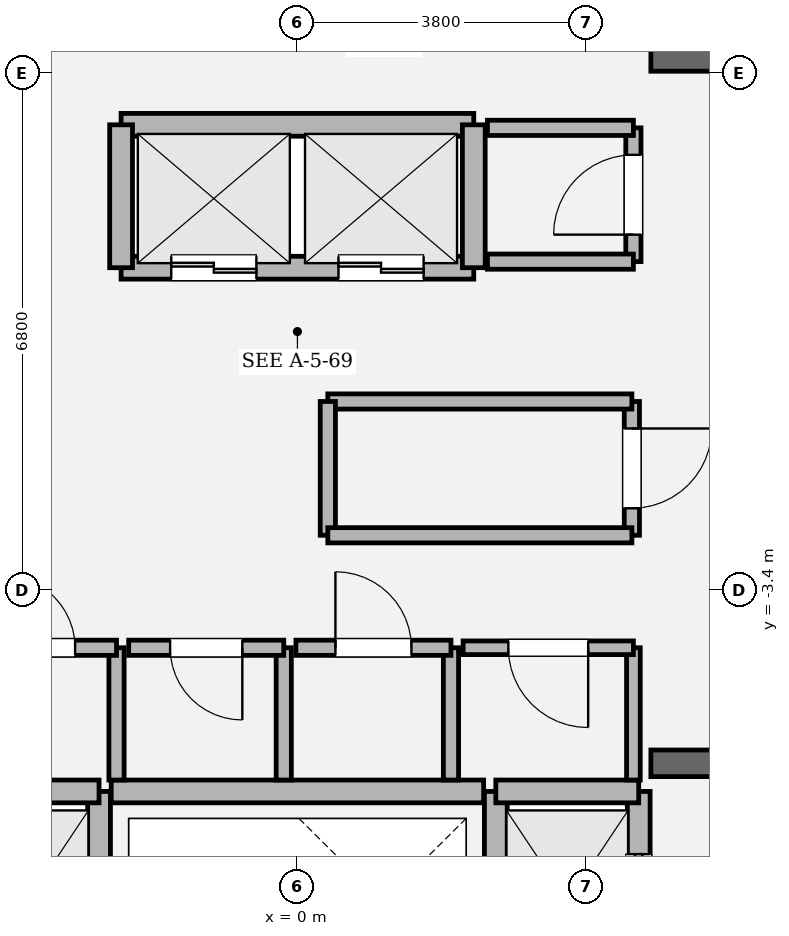
"""IFC4 building model, lengths in metres.
Left out: names, types, materials, properties, quantities, classifications, styles, units other than length and angle.
Written with IfcOpenShell. Run it as: python <this file> out.ifc"""

import sys

from ifc_helpers import new_model, si_unit, direction, frame, frame_2d, origin, place, context, subcontext, project, spatial, rectangle, extrude, element, fill, save


model = new_model("IFC4")
c1 = context("Model", 3, precision=1e-05, world=origin(), true_north=direction((0.0, 1.0)))
c2 = subcontext(c1, "Body", "Model", "MODEL_VIEW")
j1 = project(units=[si_unit("LENGTHUNIT", "METRE"), si_unit("PLANEANGLEUNIT", "RADIAN")], contexts=[c1])
p1 = place(None, origin())
s1 = spatial("IfcSite", under=j1, at=p1, CompositionType="ELEMENT")
p2 = place(p1, origin())
s2 = spatial("IfcBuilding", under=s1, at=p2, CompositionType="ELEMENT")
p3 = place(p2, frame((0.0, 0.0, 330.0)))
s3 = spatial("IfcBuildingStorey", under=s2, at=p3, CompositionType="ELEMENT", Elevation=330.0)
p4 = place(p3, frame((4.65, -5.68, 0.0), z_axis=(0.0, 0.0, 1.0), x_axis=(1.0, 0.0, 0.0)))
e1 = element("IfcWall", 1, at=p4, inside=s3, PredefinedType="SOLIDWALL", context=c2, shape_type="SweptSolid", body=[
    extrude(rectangle(XDim=5.325, YDim=0.35, at=frame_2d((2.663, 0.0))), origin(), (0.0, 0.0, 1.0), 4.2),
])
p5 = place(p4, frame((2.71, 0.0, 0.0)))
e2 = element("IfcOpeningElement", 2, at=p5, cuts=e1, PredefinedType="OPENING", context=c2, shape_type="SweptSolid", body=[
    extrude(rectangle(XDim=1.18, YDim=2.2, at=frame_2d((0.59, 1.1))), frame((0.0, 0.185, 0.0), z_axis=(0.0, -1.0, 0.0), x_axis=(1.0, 0.0, 0.0)), (0.0, 0.0, 1.0), 0.37),
])
p6 = place(p3, frame((4.65, 3.6, 0.0), z_axis=(0.0, 0.0, 1.0), x_axis=(1.0, 0.0, 0.0)))
e3 = element("IfcWall", 3, at=p6, inside=s3, PredefinedType="SOLIDWALL", context=c2, shape_type="SweptSolid", body=[
    extrude(rectangle(XDim=5.325, YDim=0.35, at=frame_2d((2.663, 0.0))), origin(), (0.0, 0.0, 1.0), 4.2),
])
p7 = place(p3, frame((-2.61, -8.82, 0.0), z_axis=(0.0, 0.0, 1.0), x_axis=(0.0, 1.0, 0.0)))
e4 = element("IfcWall", 4, at=p7, inside=s3, PredefinedType="SOLIDWALL", context=c2, shape_type="SweptSolid", body=[
    extrude(rectangle(XDim=2.77, YDim=0.3, at=frame_2d((1.385, 0.0))), origin(), (0.0, 0.0, 1.0), 3.94),
])
p8 = place(p3, frame((-4.49, -6.05, 0.0), z_axis=(0.0, 0.0, 1.0), x_axis=(1.0, 0.0, 0.0)))
e5 = element("IfcWall", 5, at=p8, inside=s3, PredefinedType="SOLIDWALL", context=c2, shape_type="SweptSolid", body=[
    extrude(rectangle(XDim=1.88, YDim=0.3, at=frame_2d((0.94, 0.0))), origin(), (0.0, 0.0, 1.0), 3.94),
])
p9 = place(p3, frame((4.49, -8.82, 0.0), z_axis=(0.0, 0.0, 1.0), x_axis=(0.0, 1.0, 0.0)))
e6 = element("IfcWall", 6, at=p9, inside=s3, PredefinedType="SOLIDWALL", context=c2, shape_type="SweptSolid", body=[
    extrude(rectangle(XDim=2.77, YDim=0.3, at=frame_2d((1.385, 0.0))), origin(), (0.0, 0.0, 1.0), 3.94),
])
p10 = place(p9, frame((0.825, 0.0, 0.0)))
e7 = element("IfcOpeningElement", 7, at=p10, cuts=e6, PredefinedType="OPENING", context=c2, shape_type="SweptSolid", body=[
    extrude(rectangle(XDim=1.12, YDim=2.25, at=frame_2d((0.56, 1.125))), frame((0.0, 0.16, 0.0), z_axis=(0.0, -1.0, 0.0), x_axis=(1.0, 0.0, 0.0)), (0.0, 0.0, 1.0), 0.32),
])
p11 = place(p3, frame((2.61, -8.82, 0.0), z_axis=(0.0, 0.0, 1.0), x_axis=(0.0, 1.0, 0.0)))
e8 = element("IfcWall", 8, at=p11, inside=s3, PredefinedType="SOLIDWALL", context=c2, shape_type="SweptSolid", body=[
    extrude(rectangle(XDim=2.77, YDim=0.3, at=frame_2d((1.385, 0.0))), origin(), (0.0, 0.0, 1.0), 3.94),
])
p12 = place(p3, frame((2.61, -6.05, 0.0), z_axis=(0.0, 0.0, 1.0), x_axis=(1.0, 0.0, 0.0)))
e9 = element("IfcWall", 9, at=p12, inside=s3, PredefinedType="SOLIDWALL", context=c2, shape_type="SweptSolid", body=[
    extrude(rectangle(XDim=1.88, YDim=0.3, at=frame_2d((0.94, 0.0))), origin(), (0.0, 0.0, 1.0), 3.94),
])
p13 = place(p3, frame((-2.32, 0.84, 0.0), z_axis=(0.0, 0.0, 1.0), x_axis=(1.0, 0.0, 0.0)))
e10 = element("IfcWall", 10, at=p13, inside=s3, PredefinedType="SOLIDWALL", context=c2, shape_type="SweptSolid", body=[
    extrude(rectangle(XDim=4.64, YDim=0.3, at=frame_2d((2.32, 0.0))), origin(), (0.0, 0.0, 1.0), 3.94),
])
p14 = place(p13, frame((0.66, 0.0, 0.0)))
e11 = element("IfcOpeningElement", 11, at=p14, cuts=e10, PredefinedType="OPENING", context=c2, shape_type="SweptSolid", body=[
    extrude(rectangle(XDim=1.12, YDim=2.25, at=frame_2d((0.56, 1.125))), frame((0.0, 0.16, 0.0), z_axis=(0.0, -1.0, 0.0), x_axis=(1.0, 0.0, 0.0)), (0.0, 0.0, 1.0), 0.32),
])
p15 = place(p13, frame((2.86, 0.0, 0.0)))
e12 = element("IfcOpeningElement", 12, at=p15, cuts=e10, PredefinedType="OPENING", context=c2, shape_type="SweptSolid", body=[
    extrude(rectangle(XDim=1.12, YDim=2.25, at=frame_2d((0.56, 1.125))), frame((0.0, 0.16, 0.0), z_axis=(0.0, -1.0, 0.0), x_axis=(1.0, 0.0, 0.0)), (0.0, 0.0, 1.0), 0.32),
])
p16 = place(p3, frame((-2.32, 2.72, 0.0), z_axis=(0.0, 0.0, 1.0), x_axis=(1.0, 0.0, 0.0)))
e13 = element("IfcWall", 13, at=p16, inside=s3, PredefinedType="SOLIDWALL", context=c2, shape_type="SweptSolid", body=[
    extrude(rectangle(XDim=4.64, YDim=0.3, at=frame_2d((2.32, 0.0))), origin(), (0.0, 0.0, 1.0), 3.94),
])
for number, where, z_axis, x_axis in (
    (14, (-2.32, 0.84, 0.0), (0.0, 0.0, 1.0), (0.0, 1.0, 0.0)),
    (15, (2.32, 0.84, 0.0), (0.0, 0.0, 1.0), (0.0, 1.0, 0.0)),
):
    element("IfcWall", number, at=place(p3, frame(where, z_axis=z_axis, x_axis=x_axis)), inside=s3, PredefinedType="SOLIDWALL", context=c2, shape_type="SweptSolid", body=[
        extrude(rectangle(XDim=1.88, YDim=0.3, at=frame_2d((0.94, 0.0))), origin(), (0.0, 0.0, 1.0), 3.94),
    ])
p17 = place(p3, frame((-2.45, -6.05, 0.0), z_axis=(0.0, 0.0, 1.0), x_axis=(1.0, 0.0, 0.0)))
e16 = element("IfcWall", 16, at=p17, inside=s3, PredefinedType="SOLIDWALL", context=c2, shape_type="SweptSolid", body=[
    extrude(rectangle(XDim=4.9, YDim=0.3, at=frame_2d((2.45, 0.0))), origin(), (0.0, 0.0, 1.0), 3.94),
])
p18 = place(p3, frame((-2.38, -5.9, 0.0), z_axis=(0.0, 0.0, 1.0), x_axis=(0.0, 1.0, 0.0)))
e17 = element("IfcWall", 17, at=p18, inside=s3, PredefinedType="SOLIDWALL", context=c2, shape_type="SweptSolid", body=[
    extrude(rectangle(XDim=1.74, YDim=0.2, at=frame_2d((0.87, 0.0))), origin(), (0.0, 0.0, 1.0), 3.94),
])
p19 = place(p3, frame((-2.38, -4.16, 0.0), z_axis=(0.0, 0.0, 1.0), x_axis=(-1.0, 0.0, 0.0)))
e18 = element("IfcWall", 18, at=p19, inside=s3, PredefinedType="SOLIDWALL", context=c2, shape_type="SweptSolid", body=[
    extrude(rectangle(XDim=2.04, YDim=0.2, at=frame_2d((1.02, 0.0))), origin(), (0.0, 0.0, 1.0), 3.94),
])
p20 = place(p19, frame((0.545, 0.0, 0.0)))
e19 = element("IfcOpeningElement", 19, at=p20, cuts=e18, PredefinedType="OPENING", context=c2, shape_type="SweptSolid", body=[
    extrude(rectangle(XDim=0.95, YDim=2.15, at=frame_2d((0.475, 1.075))), frame((0.0, 0.11, 0.0), z_axis=(0.0, -1.0, 0.0), x_axis=(1.0, 0.0, 0.0)), (0.0, 0.0, 1.0), 0.22),
])
p21 = place(p3, frame((-0.18, -5.9, 0.0), z_axis=(0.0, 0.0, 1.0), x_axis=(0.0, 1.0, 0.0)))
e20 = element("IfcWall", 20, at=p21, inside=s3, PredefinedType="SOLIDWALL", context=c2, shape_type="SweptSolid", body=[
    extrude(rectangle(XDim=1.74, YDim=0.2, at=frame_2d((0.87, 0.0))), origin(), (0.0, 0.0, 1.0), 3.94),
])
p22 = place(p3, frame((-0.18, -4.16, 0.0), z_axis=(0.0, 0.0, 1.0), x_axis=(-1.0, 0.0, 0.0)))
e21 = element("IfcWall", 21, at=p22, inside=s3, PredefinedType="SOLIDWALL", context=c2, shape_type="SweptSolid", body=[
    extrude(rectangle(XDim=2.04, YDim=0.2, at=frame_2d((1.02, 0.0))), origin(), (0.0, 0.0, 1.0), 3.94),
])
p23 = place(p22, frame((0.545, 0.0, 0.0)))
e22 = element("IfcOpeningElement", 22, at=p23, cuts=e21, PredefinedType="OPENING", context=c2, shape_type="SweptSolid", body=[
    extrude(rectangle(XDim=0.95, YDim=2.15, at=frame_2d((0.475, 1.075))), frame((0.0, 0.11, 0.0), z_axis=(0.0, -1.0, 0.0), x_axis=(1.0, 0.0, 0.0)), (0.0, 0.0, 1.0), 0.22),
])
p24 = place(p3, frame((2.02, -5.9, 0.0), z_axis=(0.0, 0.0, 1.0), x_axis=(0.0, 1.0, 0.0)))
e23 = element("IfcWall", 23, at=p24, inside=s3, PredefinedType="SOLIDWALL", context=c2, shape_type="SweptSolid", body=[
    extrude(rectangle(XDim=1.74, YDim=0.2, at=frame_2d((0.87, 0.0))), origin(), (0.0, 0.0, 1.0), 3.94),
])
p25 = place(p3, frame((2.02, -4.16, 0.0), z_axis=(0.0, 0.0, 1.0), x_axis=(-1.0, 0.0, 0.0)))
e24 = element("IfcWall", 24, at=p25, inside=s3, PredefinedType="SOLIDWALL", context=c2, shape_type="SweptSolid", body=[
    extrude(rectangle(XDim=2.04, YDim=0.2, at=frame_2d((1.02, 0.0))), origin(), (0.0, 0.0, 1.0), 3.94),
])
p26 = place(p25, frame((0.52, 0.0, 0.0)))
e25 = element("IfcOpeningElement", 25, at=p26, cuts=e24, PredefinedType="OPENING", context=c2, shape_type="SweptSolid", body=[
    extrude(rectangle(XDim=1.0, YDim=2.15, at=frame_2d((0.5, 1.075))), frame((0.0, 0.11, 0.0), z_axis=(0.0, -1.0, 0.0), x_axis=(1.0, 0.0, 0.0)), (0.0, 0.0, 1.0), 0.22),
])
p27 = place(p3, frame((4.42, -5.9, 0.0), z_axis=(0.0, 0.0, 1.0), x_axis=(0.0, 1.0, 0.0)))
e26 = element("IfcWall", 26, at=p27, inside=s3, PredefinedType="PARTITIONING", context=c2, shape_type="SweptSolid", body=[
    extrude(rectangle(XDim=1.74, YDim=0.18, at=frame_2d((0.87, 0.0))), origin(), (0.0, 0.0, 1.0), 3.94),
])
p28 = place(p3, frame((4.42, -4.16, 0.0), z_axis=(0.0, 0.0, 1.0), x_axis=(-1.0, 0.0, 0.0)))
e27 = element("IfcWall", 27, at=p28, inside=s3, PredefinedType="PARTITIONING", context=c2, shape_type="SweptSolid", body=[
    extrude(rectangle(XDim=2.24, YDim=0.18, at=frame_2d((1.12, 0.0))), origin(), (0.0, 0.0, 1.0), 3.94),
])
p29 = place(p28, frame((0.595, 0.0, 0.0)))
e28 = element("IfcOpeningElement", 28, at=p29, cuts=e27, PredefinedType="OPENING", context=c2, shape_type="SweptSolid", body=[
    extrude(rectangle(XDim=1.05, YDim=2.2, at=frame_2d((0.525, 1.1))), frame((0.0, 0.1, 0.0), z_axis=(0.0, -1.0, 0.0), x_axis=(1.0, 0.0, 0.0)), (0.0, 0.0, 1.0), 0.2),
])
p30 = place(p3, frame((4.4, -2.68, 0.0), z_axis=(0.0, 0.0, 1.0), x_axis=(0.0, 1.0, 0.0)))
e29 = element("IfcWall", 29, at=p30, inside=s3, PredefinedType="SOLIDWALL", context=c2, shape_type="SweptSolid", body=[
    extrude(rectangle(XDim=1.76, YDim=0.2, at=frame_2d((0.88, 0.0))), origin(), (0.0, 0.0, 1.0), 3.94),
])
p31 = place(p30, frame((0.355, 0.0, 0.0)))
e30 = element("IfcOpeningElement", 30, at=p31, cuts=e29, PredefinedType="OPENING", context=c2, shape_type="SweptSolid", body=[
    extrude(rectangle(XDim=1.05, YDim=2.2, at=frame_2d((0.525, 1.1))), frame((0.0, 0.11, 0.0), z_axis=(0.0, -1.0, 0.0), x_axis=(1.0, 0.0, 0.0)), (0.0, 0.0, 1.0), 0.22),
])
p32 = place(p3, frame((4.4, -0.92, 0.0), z_axis=(0.0, 0.0, 1.0), x_axis=(-1.0, 0.0, 0.0)))
e31 = element("IfcWall", 31, at=p32, inside=s3, PredefinedType="SOLIDWALL", context=c2, shape_type="SweptSolid", body=[
    extrude(rectangle(XDim=4.0, YDim=0.2, at=frame_2d((2.0, 0.0))), origin(), (0.0, 0.0, 1.0), 3.94),
])
p33 = place(p3, frame((0.4, -0.92, 0.0), z_axis=(0.0, 0.0, 1.0), x_axis=(0.0, -1.0, 0.0)))
e32 = element("IfcWall", 32, at=p33, inside=s3, PredefinedType="SOLIDWALL", context=c2, shape_type="SweptSolid", body=[
    extrude(rectangle(XDim=1.76, YDim=0.2, at=frame_2d((0.88, 0.0))), origin(), (0.0, 0.0, 1.0), 3.94),
])
p34 = place(p3, frame((0.4, -2.68, 0.0), z_axis=(0.0, 0.0, 1.0), x_axis=(1.0, 0.0, 0.0)))
e33 = element("IfcWall", 33, at=p34, inside=s3, PredefinedType="SOLIDWALL", context=c2, shape_type="SweptSolid", body=[
    extrude(rectangle(XDim=4.0, YDim=0.2, at=frame_2d((2.0, 0.0))), origin(), (0.0, 0.0, 1.0), 3.94),
])
p35 = place(p3, frame((4.42, 0.92, 0.0), z_axis=(0.0, 0.0, 1.0), x_axis=(0.0, 1.0, 0.0)))
e34 = element("IfcWall", 34, at=p35, inside=s3, PredefinedType="SOLIDWALL", context=c2, shape_type="SweptSolid", body=[
    extrude(rectangle(XDim=1.76, YDim=0.2, at=frame_2d((0.88, 0.0))), origin(), (0.0, 0.0, 1.0), 3.94),
])
p36 = place(p35, frame((0.355, 0.0, 0.0)))
e35 = element("IfcOpeningElement", 35, at=p36, cuts=e34, PredefinedType="OPENING", context=c2, shape_type="SweptSolid", body=[
    extrude(rectangle(XDim=1.05, YDim=2.2, at=frame_2d((0.525, 1.1))), frame((0.0, 0.11, 0.0), z_axis=(0.0, -1.0, 0.0), x_axis=(1.0, 0.0, 0.0)), (0.0, 0.0, 1.0), 0.22),
])
for number, where, z_axis, x_axis in (
    (36, (4.42, 2.68, 0.0), (0.0, 0.0, 1.0), (-1.0, 0.0, 0.0)),
    (37, (2.5, 0.92, 0.0), (0.0, 0.0, 1.0), (1.0, 0.0, 0.0)),
):
    element("IfcWall", number, at=place(p3, frame(where, z_axis=z_axis, x_axis=x_axis)), inside=s3, PredefinedType="SOLIDWALL", context=c2, shape_type="SweptSolid", body=[
        extrude(rectangle(XDim=1.92, YDim=0.2, at=frame_2d((0.96, 0.0))), origin(), (0.0, 0.0, 1.0), 3.94),
    ])
p37 = place(p10, origin())
e38 = element("IfcDoor", 38, at=p37, inside=s3, OperationType="SLIDING_TO_RIGHT", PredefinedType="DOOR", context=c2, shape_type="SweptSolid", body=[
    extrude(rectangle(XDim=1.12, YDim=2.25, at=frame_2d((0.56, 1.125))), frame((0.0, 0.025, 0.0), z_axis=(0.0, -1.0, 0.0), x_axis=(1.0, 0.0, 0.0)), (0.0, 0.0, 1.0), 0.05),
])
fill(e7, e38)
p38 = place(p14, origin())
e39 = element("IfcDoor", 39, at=p38, inside=s3, OperationType="DOUBLE_DOOR_SLIDING", PredefinedType="DOOR", context=c2, shape_type="SweptSolid", body=[
    extrude(rectangle(XDim=1.12, YDim=2.25, at=frame_2d((0.56, 1.125))), frame((0.0, 0.025, 0.0), z_axis=(0.0, -1.0, 0.0), x_axis=(1.0, 0.0, 0.0)), (0.0, 0.0, 1.0), 0.05),
])
fill(e11, e39)
p39 = place(p15, origin())
e40 = element("IfcDoor", 40, at=p39, inside=s3, OperationType="DOUBLE_DOOR_SLIDING", PredefinedType="DOOR", context=c2, shape_type="SweptSolid", body=[
    extrude(rectangle(XDim=1.12, YDim=2.25, at=frame_2d((0.56, 1.125))), frame((0.0, 0.025, 0.0), z_axis=(0.0, -1.0, 0.0), x_axis=(1.0, 0.0, 0.0)), (0.0, 0.0, 1.0), 0.05),
])
fill(e12, e40)
p40 = place(p20, origin())
e41 = element("IfcDoor", 41, at=p40, inside=s3, OperationType="SINGLE_SWING_RIGHT", PredefinedType="DOOR", context=c2, shape_type="SweptSolid", body=[
    extrude(rectangle(XDim=0.95, YDim=2.15, at=frame_2d((0.475, 1.075))), frame((0.0, 0.025, 0.0), z_axis=(0.0, -1.0, 0.0), x_axis=(1.0, 0.0, 0.0)), (0.0, 0.0, 1.0), 0.05),
])
fill(e19, e41)
p41 = place(p23, origin())
e42 = element("IfcDoor", 42, at=p41, inside=s3, OperationType="SINGLE_SWING_LEFT", PredefinedType="DOOR", context=c2, shape_type="SweptSolid", body=[
    extrude(rectangle(XDim=0.95, YDim=2.15, at=frame_2d((0.475, 1.075))), frame((0.0, 0.025, 0.0), z_axis=(0.0, -1.0, 0.0), x_axis=(1.0, 0.0, 0.0)), (0.0, 0.0, 1.0), 0.05),
])
fill(e22, e42)
p42 = place(p26, origin())
e43 = element("IfcDoor", 43, at=p42, inside=s3, OperationType="SINGLE_SWING_RIGHT", PredefinedType="DOOR", context=c2, shape_type="SweptSolid", body=[
    extrude(rectangle(XDim=1.0, YDim=2.15, at=frame_2d((0.5, 1.075))), frame((0.0, 0.025, 0.0), z_axis=(0.0, -1.0, 0.0), x_axis=(1.0, 0.0, 0.0)), (0.0, 0.0, 1.0), 0.05),
])
fill(e25, e43)
p43 = place(p29, origin())
e44 = element("IfcDoor", 44, at=p43, inside=s3, OperationType="SINGLE_SWING_LEFT", PredefinedType="DOOR", context=c2, shape_type="SweptSolid", body=[
    extrude(rectangle(XDim=1.05, YDim=2.2, at=frame_2d((0.525, 1.1))), frame((0.0, 0.025, 0.0), z_axis=(0.0, -1.0, 0.0), x_axis=(1.0, 0.0, 0.0)), (0.0, 0.0, 1.0), 0.05),
])
fill(e28, e44)
p44 = place(p31, origin())
e45 = element("IfcDoor", 45, at=p44, inside=s3, OperationType="SINGLE_SWING_RIGHT", PredefinedType="DOOR", context=c2, shape_type="SweptSolid", body=[
    extrude(rectangle(XDim=1.05, YDim=2.2, at=frame_2d((0.525, 1.1))), frame((0.0, 0.025, 0.0), z_axis=(0.0, -1.0, 0.0), x_axis=(1.0, 0.0, 0.0)), (0.0, 0.0, 1.0), 0.05),
])
fill(e30, e45)
p45 = place(p36, origin())
e46 = element("IfcDoor", 46, at=p45, inside=s3, OperationType="SINGLE_SWING_LEFT", PredefinedType="DOOR", context=c2, shape_type="SweptSolid", body=[
    extrude(rectangle(XDim=1.05, YDim=2.2, at=frame_2d((0.525, 1.1))), frame((0.0, 0.025, 0.0), z_axis=(0.0, -1.0, 0.0), x_axis=(1.0, 0.0, 0.0)), (0.0, 0.0, 1.0), 0.05),
])
fill(e35, e46)
save(model, sys.argv[1])
